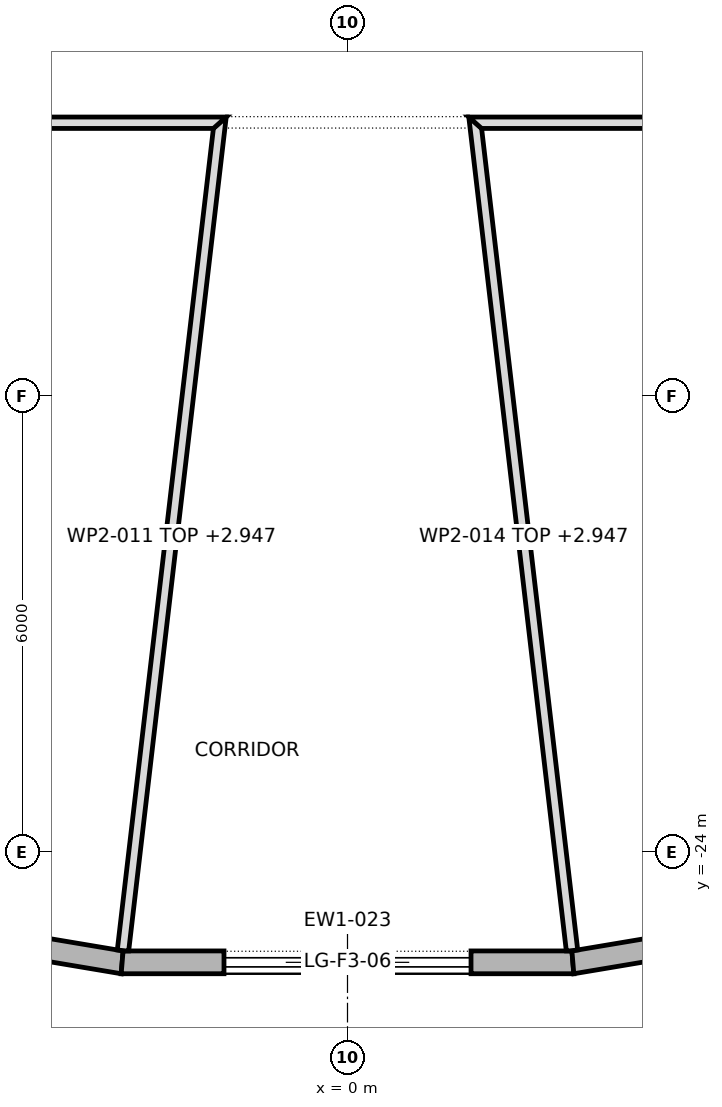
"""IFC4 building model, lengths in metres.
Left out: names, types, materials, properties, quantities, classifications, styles, units other than length and angle.
Written with IfcOpenShell. Run it as: python <this file> out.ifc"""

import sys

from ifc_helpers import new_model, si_unit, direction, frame, frame_2d, origin, place, context, subcontext, project, spatial, polyline, rectangle, outline, extrude, element, fill, save


model = new_model("IFC4")
c1 = context("Model", 3, precision=1e-05, world=origin(), true_north=direction((0.0, 1.0)))
c2 = subcontext(c1, "Body", "Model", "MODEL_VIEW")
j1 = project(units=[si_unit("LENGTHUNIT", "METRE"), si_unit("PLANEANGLEUNIT", "RADIAN")], contexts=[c1])
p1 = place(None, origin())
s1 = spatial("IfcSite", under=j1, at=p1, CompositionType="ELEMENT")
p2 = place(p1, origin())
s2 = spatial("IfcBuilding", under=s1, at=p2, CompositionType="ELEMENT")
p3 = place(p2, frame((0.0, 0.0, 186.9)))
s3 = spatial("IfcBuildingStorey", under=s2, at=p3, CompositionType="ELEMENT", Elevation=186.9)
p4 = place(p3, frame((-8.781, -24.469, 0.0), z_axis=(0.0, 0.0, 1.0), x_axis=(0.986201934369, -0.165546805001, 0.0)))
e1 = element("IfcWall", 1, at=p4, inside=s3, PredefinedType="STANDARD", context=c2, shape_type="SweptSolid", body=[
    extrude(outline(polyline([(-0.013, -0.15), (5.91, -0.15), (5.885, 0.15), (0.013, 0.15), (-0.013, -0.15)])), origin(), (0.0, 0.0, 1.0), 3.7),
])
p5 = place(p4, frame((1.324, 0.0, 0.6)))
e2 = element("IfcOpeningElement", 2, at=p5, cuts=e1, PredefinedType="OPENING", context=c2, shape_type="SweptSolid", body=[
    extrude(rectangle(XDim=3.25, YDim=2.65, at=frame_2d((1.625, 1.325))), frame((0.0, 0.162, 0.0), z_axis=(0.0, -1.0, 0.0), x_axis=(1.0, 0.0, 0.0)), (0.0, 0.0, 1.0), 0.324),
])
p6 = place(p3, frame((-2.965, -25.446, 0.0), z_axis=(0.0, 0.0, 1.0), x_axis=(1.0, 0.0, 0.0)))
e3 = element("IfcWall", 3, at=p6, inside=s3, PredefinedType="STANDARD", context=c2, shape_type="SweptSolid", body=[
    extrude(outline(polyline([(-0.012, -0.15), (5.942, -0.15), (5.917, 0.15), (0.012, 0.15), (-0.012, -0.15)])), origin(), (0.0, 0.0, 1.0), 3.7),
])
p7 = place(p6, frame((1.34, 0.0, 0.0)))
e4 = element("IfcOpeningElement", 4, at=p7, cuts=e3, PredefinedType="OPENING", context=c2, shape_type="SweptSolid", body=[
    extrude(rectangle(XDim=3.25, YDim=3.25, at=frame_2d((1.625, 1.625))), frame((0.0, 0.162, 0.0), z_axis=(0.0, -1.0, 0.0), x_axis=(1.0, 0.0, 0.0)), (0.0, 0.0, 1.0), 0.324),
])
p8 = place(p3, frame((2.965, -25.446, 0.0), z_axis=(0.0, 0.0, 1.0), x_axis=(0.986201934369, 0.165546805001, 0.0)))
e5 = element("IfcWall", 5, at=p8, inside=s3, PredefinedType="STANDARD", context=c2, shape_type="SweptSolid", body=[
    extrude(outline(polyline([(-0.012, -0.15), (5.91, -0.15), (5.885, 0.15), (0.012, 0.15), (-0.012, -0.15)])), origin(), (0.0, 0.0, 1.0), 3.7),
])
p9 = place(p8, frame((1.324, 0.0, 0.6)))
e6 = element("IfcOpeningElement", 6, at=p9, cuts=e5, PredefinedType="OPENING", context=c2, shape_type="SweptSolid", body=[
    extrude(rectangle(XDim=3.25, YDim=2.65, at=frame_2d((1.625, 1.325))), frame((0.0, 0.162, 0.0), z_axis=(0.0, -1.0, 0.0), x_axis=(1.0, 0.0, 0.0)), (0.0, 0.0, 1.0), 0.324),
])
p10 = place(p3, frame((-2.954, -25.292, 0.0), z_axis=(0.0, 0.0, 1.0), x_axis=(0.116172056535, 0.993229104125, 0.0)))
e7 = element("IfcWall", 7, at=p10, inside=s3, PredefinedType="PARTITIONING", context=c2, shape_type="SweptSolid", body=[
    extrude(outline(polyline([(11.05, -0.075), (11.05, -0.075), (10.966, 0.0), (10.882, 0.075), (9.068, 0.075), (7.254, 0.075), (5.441, 0.075), (3.627, 0.075), (1.813, 0.075), (0.0, 0.075), (0.0, -0.036), (0.005, -0.075), (1.845, -0.075), (3.686, -0.075), (5.527, -0.075), (7.368, -0.075), (9.209, -0.075), (11.05, -0.075)])), origin(), (0.0, 0.0, 1.0), 2.947),
])
p11 = place(p3, frame((-1.596, -14.4, 0.0), z_axis=(0.0, 0.0, 1.0), x_axis=(-1.0, 0.0, 0.0)))
e8 = element("IfcWall", 8, at=p11, inside=s3, PredefinedType="PARTITIONING", context=c2, shape_type="SweptSolid", body=[
    extrude(outline(polyline([(0.0, -0.075), (1.818, -0.075), (3.637, -0.075), (5.455, -0.075), (7.274, -0.075), (9.092, -0.075), (10.911, -0.075), (12.729, -0.075), (12.879, 0.075), (11.063, 0.075), (9.248, 0.075), (7.432, 0.075), (5.616, 0.075), (3.8, 0.075), (1.984, 0.075), (0.168, 0.075), (0.0, -0.075), (0.0, -0.075)])), origin(), (0.0, 0.0, 1.0), 3.7),
])
p12 = place(p3, frame((1.67, -14.316, 0.0), z_axis=(0.0, 0.0, 1.0), x_axis=(0.116172056535, -0.993229104125, 0.0)))
e9 = element("IfcWall", 9, at=p12, inside=s3, PredefinedType="PARTITIONING", context=c2, shape_type="SweptSolid", body=[
    extrude(outline(polyline([(0.0, -0.075), (1.841, -0.075), (3.682, -0.075), (5.523, -0.075), (7.364, -0.075), (9.205, -0.075), (11.045, -0.075), (11.05, -0.037), (11.05, 0.075), (9.236, 0.075), (7.423, 0.075), (5.609, 0.075), (3.795, 0.075), (1.982, 0.075), (0.168, 0.075), (0.084, 0.0), (0.0, -0.075), (0.0, -0.075)])), origin(), (0.0, 0.0, 1.0), 2.947),
])
p13 = place(p3, frame((14.475, -14.4, 0.0), z_axis=(0.0, 0.0, 1.0), x_axis=(-1.0, 0.0, 0.0)))
e10 = element("IfcWall", 10, at=p13, inside=s3, PredefinedType="PARTITIONING", context=c2, shape_type="SweptSolid", body=[
    extrude(outline(polyline([(12.879, -0.075), (12.879, -0.075), (12.711, 0.075), (10.895, 0.075), (9.079, 0.075), (7.263, 0.075), (5.448, 0.075), (3.632, 0.075), (1.816, 0.075), (0.0, 0.075), (0.15, -0.075), (1.969, -0.075), (3.787, -0.075), (5.605, -0.075), (7.424, -0.075), (9.242, -0.075), (11.061, -0.075), (12.879, -0.075)])), origin(), (0.0, 0.0, 1.0), 3.7),
])
p14 = place(p13, frame((5.535, 0.0, 0.0)))
e11 = element("IfcOpeningElement", 11, at=p14, cuts=e10, PredefinedType="OPENING", context=c2, shape_type="SweptSolid", body=[
    extrude(rectangle(XDim=1.8, YDim=2.1, at=frame_2d((0.9, 1.05))), frame((0.0, 0.087, 0.0), z_axis=(0.0, -1.0, 0.0), x_axis=(1.0, 0.0, 0.0)), (0.0, 0.0, 1.0), 0.174),
])
p15 = place(p7, origin())
e12 = element("IfcDoor", 12, at=p15, inside=s3, OperationType="DOUBLE_DOOR_SLIDING", PredefinedType="DOOR", context=c2, shape_type="SweptSolid", body=[
    extrude(rectangle(XDim=3.25, YDim=3.25, at=frame_2d((1.625, 1.625))), frame((0.0, 0.025, 0.0), z_axis=(0.0, -1.0, 0.0), x_axis=(1.0, 0.0, 0.0)), (0.0, 0.0, 1.0), 0.05),
])
fill(e4, e12)
save(model, sys.argv[1])
